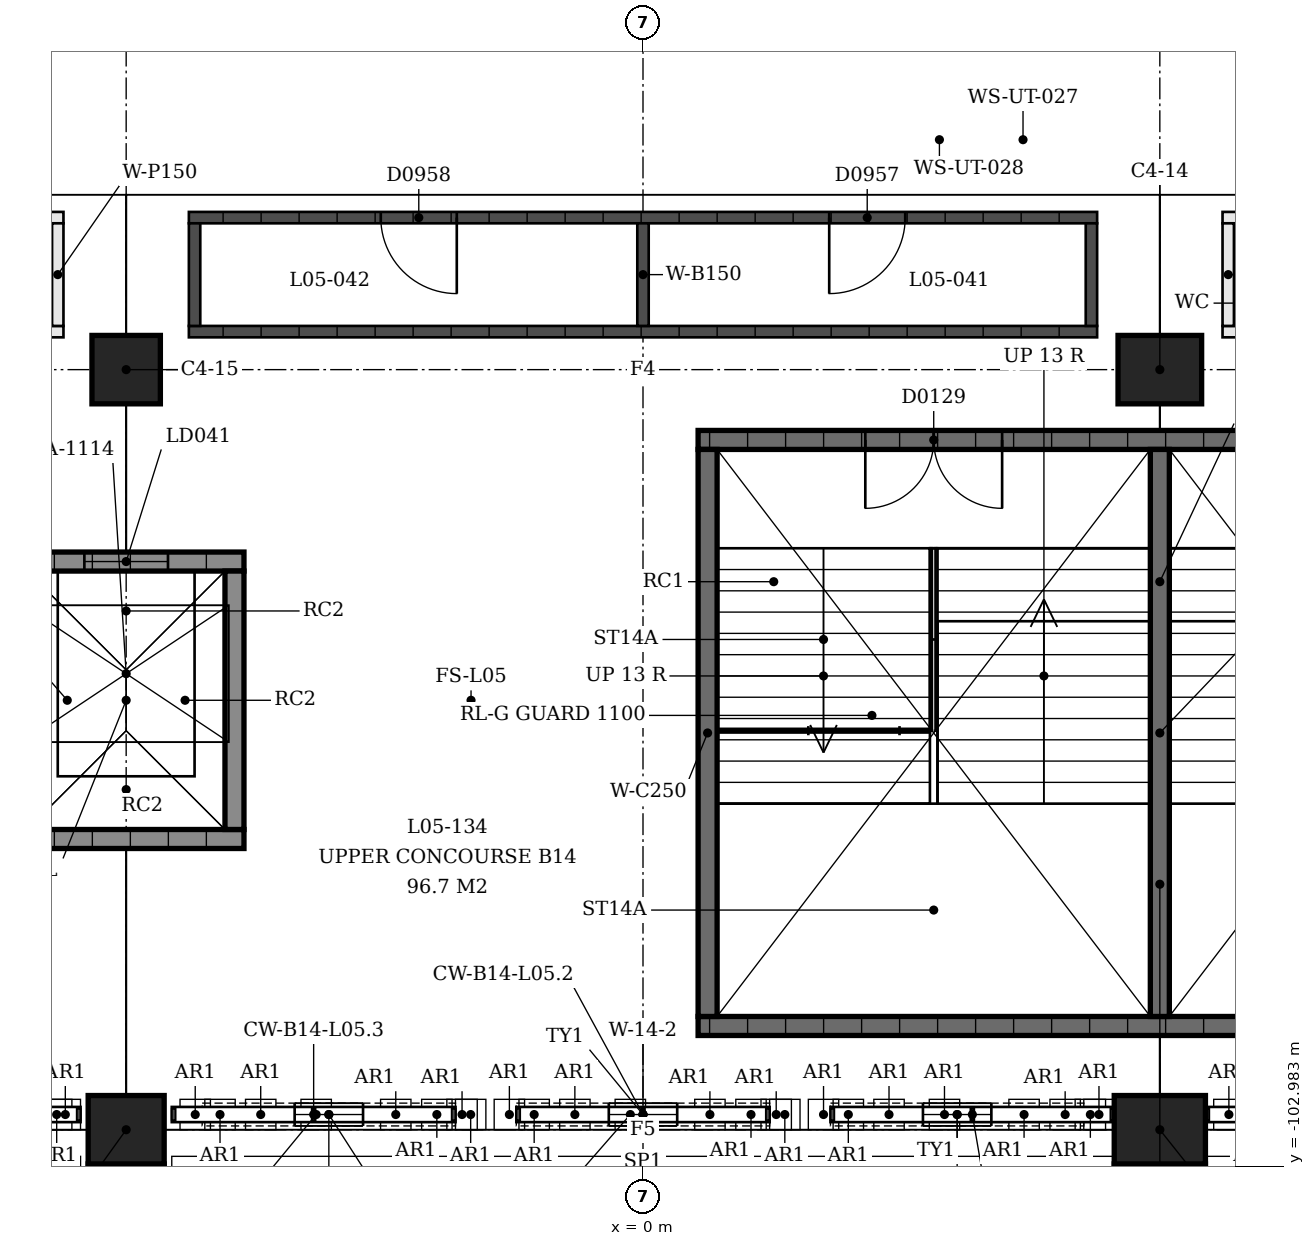
"""IFC4 building model, lengths in metres.
Left out: names, types, materials, properties, quantities, classifications, styles, units other than length and angle.
Written with IfcOpenShell. Run it as: python <this file> out.ifc"""

import sys

from ifc_helpers import new_model, si_unit, direction, frame, frame_2d, origin, origin_2d, place, context, subcontext, project, spatial, polyline, rectangle, outline, extrude, element, fill, save


model = new_model("IFC4")
c1 = context("Model", 3, precision=1e-05, world=origin(), true_north=direction((0.0, 1.0)))
c2 = subcontext(c1, "Body", "Model", "MODEL_VIEW")
j1 = project(units=[si_unit("LENGTHUNIT", "METRE"), si_unit("PLANEANGLEUNIT", "RADIAN")], contexts=[c1])
p1 = place(None, origin())
s1 = spatial("IfcSite", under=j1, at=p1, CompositionType="ELEMENT")
p2 = place(p1, origin())
s2 = spatial("IfcBuilding", under=s1, at=p2, CompositionType="ELEMENT")
p3 = place(p2, frame((0.0, 0.0, 22.5)))
s3 = spatial("IfcBuildingStorey", under=s2, at=p3, CompositionType="ELEMENT", Elevation=22.5)
p4 = place(p3, frame((6.8, -92.5, 0.0), z_axis=(0.0, 0.0, 1.0), x_axis=(1.0, 0.0, 0.0)))
e1 = element("IfcColumn", 1, at=p4, inside=s3, PredefinedType="COLUMN", context=c2, shape_type="SweptSolid", body=[
    extrude(rectangle(XDim=1.1, YDim=0.9, at=origin_2d()), origin(), (0.0, 0.0, 1.0), 6.5),
])
p5 = place(p3, frame((6.8, -102.5, 0.0), z_axis=(0.0, 0.0, 1.0), x_axis=(1.0, 0.0, 0.0)))
e2 = element("IfcColumn", 2, at=p5, inside=s3, PredefinedType="COLUMN", context=c2, shape_type="SweptSolid", body=[
    extrude(rectangle(XDim=1.2, YDim=0.9, at=origin_2d()), origin(), (0.0, 0.0, 1.0), 6.5),
])
p6 = place(p3, frame((-6.8, -92.5, 0.0), z_axis=(0.0, 0.0, 1.0), x_axis=(1.0, 0.0, 0.0)))
e3 = element("IfcColumn", 3, at=p6, inside=s3, PredefinedType="COLUMN", context=c2, shape_type="SweptSolid", body=[
    extrude(rectangle(XDim=0.9, YDim=0.9, at=origin_2d()), origin(), (0.0, 0.0, 1.0), 6.5),
])
p7 = place(p3, frame((-6.8, -102.5, 0.0), z_axis=(0.0, 0.0, 1.0), x_axis=(1.0, 0.0, 0.0)))
e4 = element("IfcColumn", 4, at=p7, inside=s3, PredefinedType="COLUMN", context=c2, shape_type="SweptSolid", body=[
    extrude(rectangle(XDim=1.0, YDim=0.9, at=origin_2d()), origin(), (0.0, 0.0, 1.0), 6.5),
])
p8 = place(p3, frame((5.8, -102.3, 4.1), z_axis=(0.0, 0.0, 1.0), x_axis=(-1.0, 0.0, 0.0)))
e5 = element("IfcWall", 5, at=p8, inside=s3, PredefinedType="SOLIDWALL", context=c2, shape_type="SweptSolid", body=[
    extrude(outline(polyline([(0.0, 0.0), (3.333, 0.0), (3.333, 0.05), (3.225, 1.288), (2.905, 2.541), (2.38, 3.722), (1.667, 4.8), (0.953, 3.722), (0.428, 2.541), (0.108, 1.288), (0.0, 0.05), (0.0, 0.0)])), frame((0.0, 0.15, 0.0), z_axis=(0.0, -1.0, 0.0), x_axis=(1.0, 0.0, 0.0)), (0.0, 0.0, 1.0), 0.3),
])
p9 = place(p8, frame((1.217, 0.0, 0.4)))
e6 = element("IfcOpeningElement", 6, at=p9, cuts=e5, PredefinedType="OPENING", context=c2, shape_type="SweptSolid", body=[
    extrude(rectangle(XDim=0.9, YDim=3.6, at=frame_2d((0.45, 1.8))), frame((0.0, 0.16, 0.0), z_axis=(0.0, -1.0, 0.0), x_axis=(1.0, 0.0, 0.0)), (0.0, 0.0, 1.0), 0.32),
])
p10 = place(p3, frame((1.667, -102.3, 4.1), z_axis=(0.0, 0.0, 1.0), x_axis=(-1.0, 0.0, 0.0)))
e7 = element("IfcWall", 7, at=p10, inside=s3, PredefinedType="SOLIDWALL", context=c2, shape_type="SweptSolid", body=[
    extrude(outline(polyline([(0.0, 0.0), (3.333, 0.0), (3.333, 0.05), (3.225, 1.288), (2.905, 2.541), (2.38, 3.722), (1.667, 4.8), (0.953, 3.722), (0.428, 2.541), (0.108, 1.288), (0.0, 0.05), (0.0, 0.0)])), frame((0.0, 0.15, 0.0), z_axis=(0.0, -1.0, 0.0), x_axis=(1.0, 0.0, 0.0)), (0.0, 0.0, 1.0), 0.3),
])
p11 = place(p10, frame((1.217, 0.0, 0.4)))
e8 = element("IfcOpeningElement", 8, at=p11, cuts=e7, PredefinedType="OPENING", context=c2, shape_type="SweptSolid", body=[
    extrude(rectangle(XDim=0.9, YDim=3.6, at=frame_2d((0.45, 1.8))), frame((0.0, 0.16, 0.0), z_axis=(0.0, -1.0, 0.0), x_axis=(1.0, 0.0, 0.0)), (0.0, 0.0, 1.0), 0.32),
])
p12 = place(p3, frame((-2.467, -102.3, 4.1), z_axis=(0.0, 0.0, 1.0), x_axis=(-1.0, 0.0, 0.0)))
e9 = element("IfcWall", 9, at=p12, inside=s3, PredefinedType="SOLIDWALL", context=c2, shape_type="SweptSolid", body=[
    extrude(outline(polyline([(0.0, 0.0), (3.333, 0.0), (3.333, 0.05), (3.225, 1.288), (2.905, 2.541), (2.38, 3.722), (1.667, 4.8), (0.953, 3.722), (0.428, 2.541), (0.108, 1.288), (0.0, 0.05), (0.0, 0.0)])), frame((0.0, 0.15, 0.0), z_axis=(0.0, -1.0, 0.0), x_axis=(1.0, 0.0, 0.0)), (0.0, 0.0, 1.0), 0.3),
])
p13 = place(p12, frame((1.217, 0.0, 0.4)))
e10 = element("IfcOpeningElement", 10, at=p13, cuts=e9, PredefinedType="OPENING", context=c2, shape_type="SweptSolid", body=[
    extrude(rectangle(XDim=0.9, YDim=3.6, at=frame_2d((0.45, 1.8))), frame((0.0, 0.16, 0.0), z_axis=(0.0, -1.0, 0.0), x_axis=(1.0, 0.0, 0.0)), (0.0, 0.0, 1.0), 0.32),
])
p14 = place(p3, frame((0.725, -93.425, 0.0), z_axis=(0.0, 0.0, 1.0), x_axis=(1.0, 0.0, 0.0)))
e11 = element("IfcWall", 11, at=p14, inside=s3, PredefinedType="SHEAR", context=c2, shape_type="SweptSolid", body=[
    extrude(rectangle(XDim=12.15, YDim=0.25, at=frame_2d((6.075, 0.0))), origin(), (0.0, 0.0, 1.0), 2.1),
])
p15 = place(p14, frame((2.2, 0.0, 0.0)))
e12 = element("IfcOpeningElement", 12, at=p15, cuts=e11, PredefinedType="OPENING", context=c2, shape_type="SweptSolid", body=[
    extrude(rectangle(XDim=1.8, YDim=2.1, at=frame_2d((0.9, 1.05))), frame((0.0, 0.125, 0.0), z_axis=(0.0, -1.0, 0.0), x_axis=(1.0, 0.0, 0.0)), (0.0, 0.0, 1.0), 0.25),
])
p16 = place(p14, frame((8.15, 0.0, 0.0)))
e13 = element("IfcOpeningElement", 13, at=p16, cuts=e11, PredefinedType="OPENING", context=c2, shape_type="SweptSolid", body=[
    extrude(rectangle(XDim=1.8, YDim=2.1, at=frame_2d((0.9, 1.05))), frame((0.0, 0.125, 0.0), z_axis=(0.0, -1.0, 0.0), x_axis=(1.0, 0.0, 0.0)), (0.0, 0.0, 1.0), 0.25),
])
p17 = place(p3, frame((0.725, -101.135, 0.0), z_axis=(0.0, 0.0, 1.0), x_axis=(1.0, 0.0, 0.0)))
e14 = element("IfcWall", 14, at=p17, inside=s3, PredefinedType="SHEAR", context=c2, shape_type="SweptSolid", body=[
    extrude(rectangle(XDim=12.15, YDim=0.25, at=frame_2d((6.075, 0.0))), origin(), (0.0, 0.0, 1.0), 2.1),
])
for number, where, z_axis, x_axis in (
    (15, (0.85, -93.55, 0.0), (0.0, 0.0, 1.0), (0.0, -1.0, 0.0)),
    (16, (6.8, -93.55, 0.0), (0.0, 0.0, 1.0), (0.0, -1.0, 0.0)),
):
    element("IfcWall", number, at=place(p3, frame(where, z_axis=z_axis, x_axis=x_axis)), inside=s3, PredefinedType="SHEAR", context=c2, shape_type="SweptSolid", body=[
        extrude(rectangle(XDim=7.46, YDim=0.25, at=frame_2d((3.73, 0.0))), origin(), (0.0, 0.0, 1.0), 2.1),
    ])
p18 = place(p3, frame((-8.35, -95.025, 0.0), z_axis=(0.0, 0.0, 1.0), x_axis=(1.0, 0.0, 0.0)))
e17 = element("IfcWall", 17, at=p18, inside=s3, PredefinedType="SHEAR", context=c2, shape_type="SweptSolid", body=[
    extrude(rectangle(XDim=3.1, YDim=0.25, at=frame_2d((1.55, 0.0))), origin(), (0.0, 0.0, 1.0), 3.4),
])
p19 = place(p18, frame((1.0, 0.0, 0.0)))
e18 = element("IfcOpeningElement", 18, at=p19, cuts=e17, PredefinedType="OPENING", context=c2, shape_type="SweptSolid", body=[
    extrude(rectangle(XDim=1.1, YDim=2.1, at=frame_2d((0.55, 1.05))), frame((0.0, 0.125, 0.0), z_axis=(0.0, -1.0, 0.0), x_axis=(1.0, 0.0, 0.0)), (0.0, 0.0, 1.0), 0.25),
])
p20 = place(p3, frame((-8.35, -98.675, 0.0), z_axis=(0.0, 0.0, 1.0), x_axis=(1.0, 0.0, 0.0)))
e19 = element("IfcWall", 19, at=p20, inside=s3, PredefinedType="SHEAR", context=c2, shape_type="SweptSolid", body=[
    extrude(rectangle(XDim=3.1, YDim=0.25, at=frame_2d((1.55, 0.0))), origin(), (0.0, 0.0, 1.0), 3.4),
])
p21 = place(p3, frame((-5.375, -95.15, 0.0), z_axis=(0.0, 0.0, 1.0), x_axis=(0.0, -1.0, 0.0)))
e20 = element("IfcWall", 20, at=p21, inside=s3, PredefinedType="SHEAR", context=c2, shape_type="SweptSolid", body=[
    extrude(rectangle(XDim=3.4, YDim=0.25, at=frame_2d((1.7, 0.0))), origin(), (0.0, 0.0, 1.0), 3.4),
])
p22 = place(p3, frame((7.625, -90.5, 0.0), z_axis=(0.0, 0.0, 1.0), x_axis=(1.0, 0.0, 0.0)))
e21 = element("IfcWall", 21, at=p22, inside=s3, PredefinedType="PARTITIONING", context=c2, shape_type="SweptSolid", body=[
    extrude(rectangle(XDim=11.95, YDim=0.15, at=frame_2d((5.975, 0.0))), origin(), (0.0, 0.0, 1.0), 3.0),
])
p23 = place(p22, frame((1.454, 0.0, 0.0)))
e22 = element("IfcOpeningElement", 22, at=p23, cuts=e21, PredefinedType="OPENING", context=c2, shape_type="SweptSolid", body=[
    extrude(rectangle(XDim=0.9, YDim=2.1, at=frame_2d((0.45, 1.05))), frame((0.0, 0.075, 0.0), z_axis=(0.0, -1.0, 0.0), x_axis=(1.0, 0.0, 0.0)), (0.0, 0.0, 1.0), 0.15),
])
p24 = place(p22, frame((5.112, 0.0, 0.0)))
e23 = element("IfcOpeningElement", 23, at=p24, cuts=e21, PredefinedType="OPENING", context=c2, shape_type="SweptSolid", body=[
    extrude(rectangle(XDim=0.9, YDim=2.1, at=frame_2d((0.45, 1.05))), frame((0.0, 0.075, 0.0), z_axis=(0.0, -1.0, 0.0), x_axis=(1.0, 0.0, 0.0)), (0.0, 0.0, 1.0), 0.15),
])
p25 = place(p22, frame((7.962, 0.0, 0.0)))
e24 = element("IfcOpeningElement", 24, at=p25, cuts=e21, PredefinedType="OPENING", context=c2, shape_type="SweptSolid", body=[
    extrude(rectangle(XDim=1.1, YDim=2.1, at=frame_2d((0.55, 1.05))), frame((0.0, 0.075, 0.0), z_axis=(0.0, -1.0, 0.0), x_axis=(1.0, 0.0, 0.0)), (0.0, 0.0, 1.0), 0.15),
])
p26 = place(p22, frame((10.204, 0.0, 0.0)))
e25 = element("IfcOpeningElement", 25, at=p26, cuts=e21, PredefinedType="OPENING", context=c2, shape_type="SweptSolid", body=[
    extrude(rectangle(XDim=1.1, YDim=2.1, at=frame_2d((0.55, 1.05))), frame((0.0, 0.075, 0.0), z_axis=(0.0, -1.0, 0.0), x_axis=(1.0, 0.0, 0.0)), (0.0, 0.0, 1.0), 0.15),
])
p27 = place(p3, frame((7.625, -92.0, 0.0), z_axis=(0.0, 0.0, 1.0), x_axis=(1.0, 0.0, 0.0)))
e26 = element("IfcWall", 26, at=p27, inside=s3, PredefinedType="PARTITIONING", context=c2, shape_type="SweptSolid", body=[
    extrude(rectangle(XDim=11.95, YDim=0.15, at=frame_2d((5.975, 0.0))), origin(), (0.0, 0.0, 1.0), 3.0),
])
p28 = place(p3, frame((7.7, -90.575, 0.0), z_axis=(0.0, 0.0, 1.0), x_axis=(0.0, -1.0, 0.0)))
e27 = element("IfcWall", 27, at=p28, inside=s3, PredefinedType="PARTITIONING", context=c2, shape_type="SweptSolid", body=[
    extrude(rectangle(XDim=1.35, YDim=0.15, at=frame_2d((0.675, 0.0))), origin(), (0.0, 0.0, 1.0), 3.0),
])
p29 = place(p3, frame((5.975, -90.5, 0.0), z_axis=(0.0, 0.0, 1.0), x_axis=(-1.0, 0.0, 0.0)))
e28 = element("IfcWall", 28, at=p29, inside=s3, PredefinedType="SOLIDWALL", context=c2, shape_type="SweptSolid", body=[
    extrude(rectangle(XDim=11.95, YDim=0.15, at=frame_2d((5.975, 0.0))), origin(), (0.0, 0.0, 1.0), 3.0),
])
p30 = place(p29, frame((2.525, 0.0, 0.0)))
e29 = element("IfcOpeningElement", 29, at=p30, cuts=e28, PredefinedType="OPENING", context=c2, shape_type="SweptSolid", body=[
    extrude(rectangle(XDim=1.0, YDim=2.1, at=frame_2d((0.5, 1.05))), frame((0.0, 0.075, 0.0), z_axis=(0.0, -1.0, 0.0), x_axis=(1.0, 0.0, 0.0)), (0.0, 0.0, 1.0), 0.15),
])
p31 = place(p29, frame((8.425, 0.0, 0.0)))
e30 = element("IfcOpeningElement", 30, at=p31, cuts=e28, PredefinedType="OPENING", context=c2, shape_type="SweptSolid", body=[
    extrude(rectangle(XDim=1.0, YDim=2.1, at=frame_2d((0.5, 1.05))), frame((0.0, 0.075, 0.0), z_axis=(0.0, -1.0, 0.0), x_axis=(1.0, 0.0, 0.0)), (0.0, 0.0, 1.0), 0.15),
])
p32 = place(p3, frame((5.975, -92.0, 0.0), z_axis=(0.0, 0.0, 1.0), x_axis=(-1.0, 0.0, 0.0)))
e31 = element("IfcWall", 31, at=p32, inside=s3, PredefinedType="SOLIDWALL", context=c2, shape_type="SweptSolid", body=[
    extrude(rectangle(XDim=11.95, YDim=0.15, at=frame_2d((5.975, 0.0))), origin(), (0.0, 0.0, 1.0), 3.0),
])
for number, where, z_axis, x_axis in (
    (32, (5.9, -90.575, 0.0), (0.0, 0.0, 1.0), (0.0, -1.0, 0.0)),
    (33, (0.0, -90.575, 0.0), (0.0, 0.0, 1.0), (0.0, -1.0, 0.0)),
    (34, (-5.9, -90.575, 0.0), (0.0, 0.0, 1.0), (0.0, -1.0, 0.0)),
):
    element("IfcWall", number, at=place(p3, frame(where, z_axis=z_axis, x_axis=x_axis)), inside=s3, PredefinedType="SOLIDWALL", context=c2, shape_type="SweptSolid", body=[
        extrude(rectangle(XDim=1.35, YDim=0.15, at=frame_2d((0.675, 0.0))), origin(), (0.0, 0.0, 1.0), 3.0),
    ])
p33 = place(p3, frame((-19.575, -90.5, 0.0), z_axis=(0.0, 0.0, 1.0), x_axis=(1.0, 0.0, 0.0)))
e35 = element("IfcWall", 35, at=p33, inside=s3, PredefinedType="PARTITIONING", context=c2, shape_type="SweptSolid", body=[
    extrude(rectangle(XDim=11.95, YDim=0.15, at=frame_2d((5.975, 0.0))), origin(), (0.0, 0.0, 1.0), 3.0),
])
p34 = place(p33, frame((1.454, 0.0, 0.0)))
e36 = element("IfcOpeningElement", 36, at=p34, cuts=e35, PredefinedType="OPENING", context=c2, shape_type="SweptSolid", body=[
    extrude(rectangle(XDim=0.9, YDim=2.1, at=frame_2d((0.45, 1.05))), frame((0.0, 0.075, 0.0), z_axis=(0.0, -1.0, 0.0), x_axis=(1.0, 0.0, 0.0)), (0.0, 0.0, 1.0), 0.15),
])
p35 = place(p33, frame((5.112, 0.0, 0.0)))
e37 = element("IfcOpeningElement", 37, at=p35, cuts=e35, PredefinedType="OPENING", context=c2, shape_type="SweptSolid", body=[
    extrude(rectangle(XDim=0.9, YDim=2.1, at=frame_2d((0.45, 1.05))), frame((0.0, 0.075, 0.0), z_axis=(0.0, -1.0, 0.0), x_axis=(1.0, 0.0, 0.0)), (0.0, 0.0, 1.0), 0.15),
])
p36 = place(p33, frame((7.962, 0.0, 0.0)))
e38 = element("IfcOpeningElement", 38, at=p36, cuts=e35, PredefinedType="OPENING", context=c2, shape_type="SweptSolid", body=[
    extrude(rectangle(XDim=1.1, YDim=2.1, at=frame_2d((0.55, 1.05))), frame((0.0, 0.075, 0.0), z_axis=(0.0, -1.0, 0.0), x_axis=(1.0, 0.0, 0.0)), (0.0, 0.0, 1.0), 0.15),
])
p37 = place(p33, frame((10.204, 0.0, 0.0)))
e39 = element("IfcOpeningElement", 39, at=p37, cuts=e35, PredefinedType="OPENING", context=c2, shape_type="SweptSolid", body=[
    extrude(rectangle(XDim=1.1, YDim=2.1, at=frame_2d((0.55, 1.05))), frame((0.0, 0.075, 0.0), z_axis=(0.0, -1.0, 0.0), x_axis=(1.0, 0.0, 0.0)), (0.0, 0.0, 1.0), 0.15),
])
p38 = place(p3, frame((-19.575, -92.0, 0.0), z_axis=(0.0, 0.0, 1.0), x_axis=(1.0, 0.0, 0.0)))
e40 = element("IfcWall", 40, at=p38, inside=s3, PredefinedType="PARTITIONING", context=c2, shape_type="SweptSolid", body=[
    extrude(rectangle(XDim=11.95, YDim=0.15, at=frame_2d((5.975, 0.0))), origin(), (0.0, 0.0, 1.0), 3.0),
])
p39 = place(p3, frame((-7.7, -90.575, 0.0), z_axis=(0.0, 0.0, 1.0), x_axis=(0.0, -1.0, 0.0)))
e41 = element("IfcWall", 41, at=p39, inside=s3, PredefinedType="PARTITIONING", context=c2, shape_type="SweptSolid", body=[
    extrude(rectangle(XDim=1.35, YDim=0.15, at=frame_2d((0.675, 0.0))), origin(), (0.0, 0.0, 1.0), 3.0),
])
p40 = place(p9, origin())
e42 = element("IfcWindow", 42, at=p40, inside=s3, PartitioningType="SINGLE_PANEL", PredefinedType="WINDOW", context=c2, shape_type="SweptSolid", body=[
    extrude(rectangle(XDim=0.9, YDim=3.6, at=frame_2d((0.45, 1.8))), frame((0.0, 0.03, 0.0), z_axis=(0.0, -1.0, 0.0), x_axis=(1.0, 0.0, 0.0)), (0.0, 0.0, 1.0), 0.06),
])
fill(e6, e42)
p41 = place(p11, origin())
e43 = element("IfcWindow", 43, at=p41, inside=s3, PartitioningType="SINGLE_PANEL", PredefinedType="WINDOW", context=c2, shape_type="SweptSolid", body=[
    extrude(rectangle(XDim=0.9, YDim=3.6, at=frame_2d((0.45, 1.8))), frame((0.0, 0.03, 0.0), z_axis=(0.0, -1.0, 0.0), x_axis=(1.0, 0.0, 0.0)), (0.0, 0.0, 1.0), 0.06),
])
fill(e8, e43)
p42 = place(p13, origin())
e44 = element("IfcWindow", 44, at=p42, inside=s3, PartitioningType="SINGLE_PANEL", PredefinedType="WINDOW", context=c2, shape_type="SweptSolid", body=[
    extrude(rectangle(XDim=0.9, YDim=3.6, at=frame_2d((0.45, 1.8))), frame((0.0, 0.03, 0.0), z_axis=(0.0, -1.0, 0.0), x_axis=(1.0, 0.0, 0.0)), (0.0, 0.0, 1.0), 0.06),
])
fill(e10, e44)
p43 = place(p15, origin())
e45 = element("IfcDoor", 45, at=p43, inside=s3, OperationType="DOUBLE_DOOR_SINGLE_SWING", PredefinedType="DOOR", context=c2, shape_type="SweptSolid", body=[
    extrude(rectangle(XDim=1.8, YDim=2.1, at=frame_2d((0.9, 1.05))), frame((0.0, 0.025, 0.0), z_axis=(0.0, -1.0, 0.0), x_axis=(1.0, 0.0, 0.0)), (0.0, 0.0, 1.0), 0.05),
])
fill(e12, e45)
p44 = place(p19, origin())
e46 = element("IfcDoor", 46, at=p44, inside=s3, OperationType="SLIDING_TO_LEFT", PredefinedType="DOOR", context=c2, shape_type="SweptSolid", body=[
    extrude(rectangle(XDim=1.1, YDim=2.1, at=frame_2d((0.55, 1.05))), frame((0.0, 0.025, 0.0), z_axis=(0.0, -1.0, 0.0), x_axis=(1.0, 0.0, 0.0)), (0.0, 0.0, 1.0), 0.05),
])
fill(e18, e46)
p45 = place(p30, origin())
e47 = element("IfcDoor", 47, at=p45, inside=s3, OperationType="SINGLE_SWING_LEFT", PredefinedType="DOOR", context=c2, shape_type="SweptSolid", body=[
    extrude(rectangle(XDim=1.0, YDim=2.1, at=frame_2d((0.5, 1.05))), frame((0.0, 0.025, 0.0), z_axis=(0.0, -1.0, 0.0), x_axis=(1.0, 0.0, 0.0)), (0.0, 0.0, 1.0), 0.05),
])
fill(e29, e47)
p46 = place(p31, origin())
e48 = element("IfcDoor", 48, at=p46, inside=s3, OperationType="SINGLE_SWING_RIGHT", PredefinedType="DOOR", context=c2, shape_type="SweptSolid", body=[
    extrude(rectangle(XDim=1.0, YDim=2.1, at=frame_2d((0.5, 1.05))), frame((0.0, 0.025, 0.0), z_axis=(0.0, -1.0, 0.0), x_axis=(1.0, 0.0, 0.0)), (0.0, 0.0, 1.0), 0.05),
])
fill(e30, e48)
save(model, sys.argv[1])
